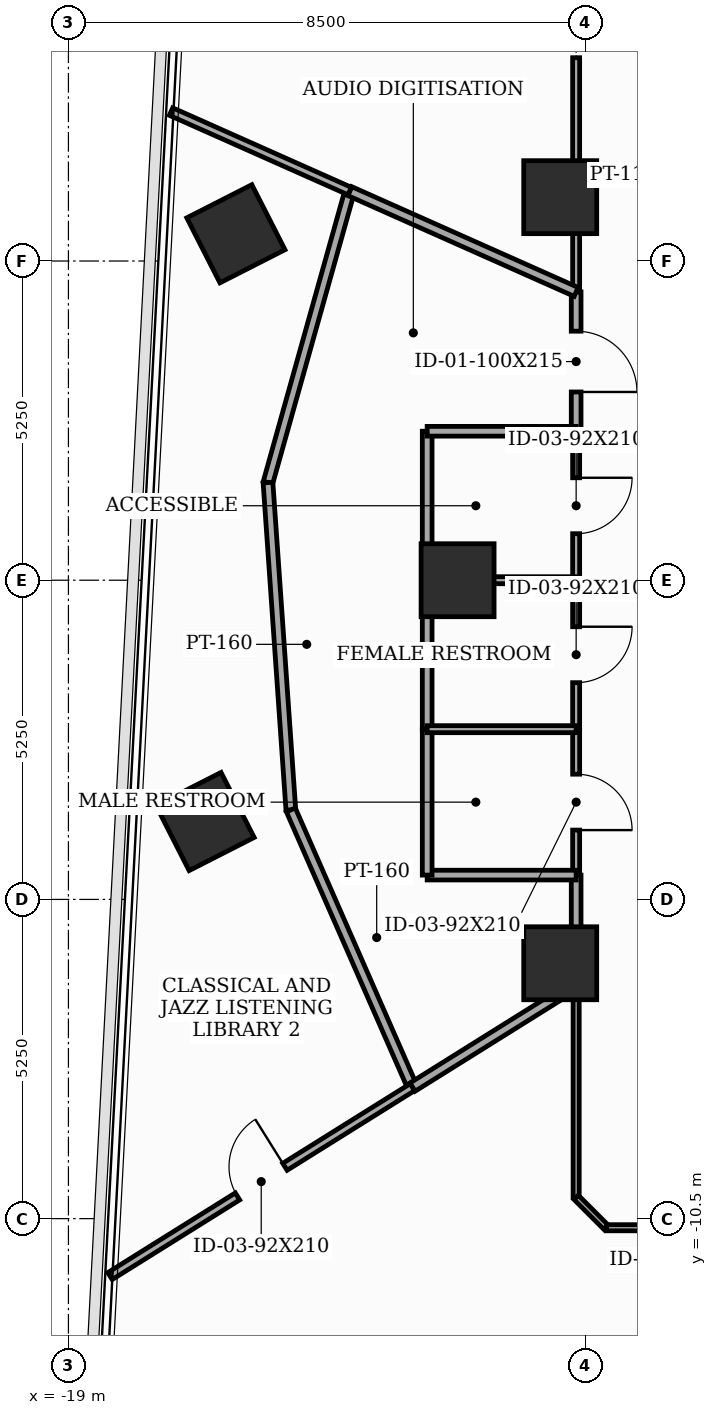
"""IFC4 building model, lengths in metres.
Left out: names, types, materials, properties, quantities, classifications, styles, units other than length and angle.
Written with IfcOpenShell. Run it as: python <this file> out.ifc"""

import sys

from ifc_helpers import new_model, si_unit, direction, frame, frame_2d, origin, origin_2d, place, context, subcontext, project, spatial, rectangle, extrude, element, fill, save


model = new_model("IFC4")
c1 = context("Model", 3, precision=1e-05, world=origin(), true_north=direction((0.0, 1.0)))
c2 = subcontext(c1, "Body", "Model", "MODEL_VIEW")
j1 = project(units=[si_unit("LENGTHUNIT", "METRE"), si_unit("PLANEANGLEUNIT", "RADIAN")], contexts=[c1])
p1 = place(None, origin())
s1 = spatial("IfcSite", under=j1, at=p1, CompositionType="ELEMENT")
p2 = place(p1, origin())
s2 = spatial("IfcBuilding", under=s1, at=p2, CompositionType="ELEMENT")
p3 = place(p2, frame((0.0, 0.0, 131.0)))
s3 = spatial("IfcBuildingStorey", under=s2, at=p3, CompositionType="ELEMENT", Elevation=131.0)
for number, where, z_axis, x_axis in (
    (1, (-10.912, 6.3, 0.0), (0.0, 0.0, 1.0), (1.0, 0.0, 0.0)),
    (2, (-12.6, 0.0, 0.0), (0.0, 0.0, 1.0), (1.0, 0.0, 0.0)),
    (3, (-10.912, -6.3, 0.0), (0.0, 0.0, 1.0), (1.0, 0.0, 0.0)),
    (4, (-16.246, 5.698, 0.0), (0.0, 0.0, 1.0), (0.891, 0.454, 0.0)),
    (5, (-16.752, -3.969, 0.0), (0.0, 0.0, 1.0), (0.891, 0.454, 0.0)),
):
    element("IfcColumn", number, at=place(p3, frame(where, z_axis=z_axis, x_axis=x_axis)), inside=s3, PredefinedType="COLUMN", context=c2, shape_type="SweptSolid", body=[
        extrude(rectangle(XDim=1.2, YDim=1.2, at=origin_2d()), origin(), (0.0, 0.0, 1.0), 3.7),
    ])
p4 = place(p3, frame((-10.65, -4.85, 0.0), z_axis=(0.0, 0.0, 1.0), x_axis=(0.0, -1.0, 0.0)))
e6 = element("IfcWall", 6, at=p4, inside=s3, PredefinedType="PARTITIONING", context=c2, shape_type="SweptSolid", body=[
    extrude(rectangle(XDim=1.805, YDim=0.16, at=frame_2d((0.902, 0.0))), origin(), (0.0, 0.0, 1.0), 2.785),
])
p5 = place(p3, frame((-10.65, 4.742, 0.0), z_axis=(0.0, 0.0, 1.0), x_axis=(0.0, -1.0, 0.0)))
e7 = element("IfcWall", 7, at=p5, inside=s3, PredefinedType="PARTITIONING", context=c2, shape_type="SweptSolid", body=[
    extrude(rectangle(XDim=2.292, YDim=0.16, at=frame_2d((1.146, 0.0))), origin(), (0.0, 0.0, 1.0), 3.5),
])
p6 = place(p5, frame((0.646, 0.0, 0.0)))
e8 = element("IfcOpeningElement", 8, at=p6, cuts=e7, PredefinedType="OPENING", context=c2, shape_type="SweptSolid", body=[
    extrude(rectangle(XDim=1.0, YDim=2.15, at=frame_2d((0.5, 1.075))), frame((0.0, 0.09, 0.0), z_axis=(0.0, -1.0, 0.0), x_axis=(1.0, 0.0, 0.0)), (0.0, 0.0, 1.0), 0.18),
])
p7 = place(p3, frame((-10.65, 0.0, 0.0), z_axis=(0.0, 0.0, 1.0), x_axis=(0.0, -1.0, 0.0)))
e9 = element("IfcWall", 9, at=p7, inside=s3, PredefinedType="PARTITIONING", context=c2, shape_type="SweptSolid", body=[
    extrude(rectangle(XDim=2.45, YDim=0.115, at=frame_2d((1.225, 0.0))), origin(), (0.0, 0.0, 1.0), 2.785),
])
p8 = place(p7, frame((0.765, 0.0, 0.0)))
e10 = element("IfcOpeningElement", 10, at=p8, cuts=e9, PredefinedType="OPENING", context=c2, shape_type="SweptSolid", body=[
    extrude(rectangle(XDim=0.92, YDim=2.1, at=frame_2d((0.46, 1.05))), frame((0.0, 0.067, 0.0), z_axis=(0.0, -1.0, 0.0), x_axis=(1.0, 0.0, 0.0)), (0.0, 0.0, 1.0), 0.135),
])
p9 = place(p3, frame((-10.65, -2.45, 0.0), z_axis=(0.0, 0.0, 1.0), x_axis=(0.0, -1.0, 0.0)))
e11 = element("IfcWall", 11, at=p9, inside=s3, PredefinedType="PARTITIONING", context=c2, shape_type="SweptSolid", body=[
    extrude(rectangle(XDim=2.4, YDim=0.115, at=frame_2d((1.2, 0.0))), origin(), (0.0, 0.0, 1.0), 3.5),
])
p10 = place(p9, frame((0.74, 0.0, 0.0)))
e12 = element("IfcOpeningElement", 12, at=p10, cuts=e11, PredefinedType="OPENING", context=c2, shape_type="SweptSolid", body=[
    extrude(rectangle(XDim=0.92, YDim=2.1, at=frame_2d((0.46, 1.05))), frame((0.0, 0.067, 0.0), z_axis=(0.0, -1.0, 0.0), x_axis=(1.0, 0.0, 0.0)), (0.0, 0.0, 1.0), 0.135),
])
p11 = place(p3, frame((-10.65, -6.655, 0.0), z_axis=(0.0, 0.0, 1.0), x_axis=(0.0, -1.0, 0.0)))
e13 = element("IfcWall", 13, at=p11, inside=s3, PredefinedType="MOVABLE", context=c2, shape_type="SweptSolid", body=[
    extrude(rectangle(XDim=3.495, YDim=0.1, at=frame_2d((1.748, 0.0))), origin(), (0.0, 0.0, 1.0), 2.785),
])
p12 = place(p3, frame((-10.65, -10.15, 0.0), z_axis=(0.0, 0.0, 1.0), x_axis=(0.707106781187, -0.707106781187, 0.0)))
e14 = element("IfcWall", 14, at=p12, inside=s3, PredefinedType="MOVABLE", context=c2, shape_type="SweptSolid", body=[
    extrude(rectangle(XDim=0.707, YDim=0.1, at=frame_2d((0.354, 0.0))), origin(), (0.0, 0.0, 1.0), 3.5),
])
p13 = place(p3, frame((-10.15, -10.65, 0.0), z_axis=(0.0, 0.0, 1.0), x_axis=(1.0, 0.0, 0.0)))
e15 = element("IfcWall", 15, at=p13, inside=s3, PredefinedType="MOVABLE", context=c2, shape_type="SweptSolid", body=[
    extrude(rectangle(XDim=5.847, YDim=0.1, at=frame_2d((2.923, 0.0))), origin(), (0.0, 0.0, 1.0), 2.785),
])
p14 = place(p13, frame((0.709, 0.0, 0.0)))
e16 = element("IfcOpeningElement", 16, at=p14, cuts=e15, PredefinedType="OPENING", context=c2, shape_type="SweptSolid", body=[
    extrude(rectangle(XDim=0.92, YDim=2.1, at=frame_2d((0.46, 1.05))), frame((0.0, 0.06, 0.0), z_axis=(0.0, -1.0, 0.0), x_axis=(1.0, 0.0, 0.0)), (0.0, 0.0, 1.0), 0.12),
])
p15 = place(p3, frame((-10.65, 10.15, 0.0), z_axis=(0.0, 0.0, 1.0), x_axis=(0.0, -1.0, 0.0)))
e17 = element("IfcWall", 17, at=p15, inside=s3, PredefinedType="PARTITIONING", context=c2, shape_type="SweptSolid", body=[
    extrude(rectangle(XDim=5.408, YDim=0.115, at=frame_2d((2.704, 0.0))), origin(), (0.0, 0.0, 1.0), 2.785),
])
p16 = place(p15, frame((0.607, 0.0, 0.0)))
e18 = element("IfcOpeningElement", 18, at=p16, cuts=e17, PredefinedType="OPENING", context=c2, shape_type="SweptSolid", body=[
    extrude(rectangle(XDim=0.95, YDim=2.1, at=frame_2d((0.475, 1.05))), frame((0.0, 0.067, 0.0), z_axis=(0.0, -1.0, 0.0), x_axis=(1.0, 0.0, 0.0)), (0.0, 0.0, 1.0), 0.135),
])
p17 = place(p3, frame((-10.65, 2.45, 0.0), z_axis=(0.0, 0.0, 1.0), x_axis=(0.0, -1.0, 0.0)))
e19 = element("IfcWall", 19, at=p17, inside=s3, PredefinedType="PARTITIONING", context=c2, shape_type="SweptSolid", body=[
    extrude(rectangle(XDim=2.45, YDim=0.115, at=frame_2d((1.225, 0.0))), origin(), (0.0, 0.0, 1.0), 2.785),
])
p18 = place(p17, frame((0.765, 0.0, 0.0)))
e20 = element("IfcOpeningElement", 20, at=p18, cuts=e19, PredefinedType="OPENING", context=c2, shape_type="SweptSolid", body=[
    extrude(rectangle(XDim=0.92, YDim=2.1, at=frame_2d((0.46, 1.05))), frame((0.0, 0.067, 0.0), z_axis=(0.0, -1.0, 0.0), x_axis=(1.0, 0.0, 0.0)), (0.0, 0.0, 1.0), 0.135),
])
p19 = place(p3, frame((-13.1, -2.45, 0.0), z_axis=(0.0, 0.0, 1.0), x_axis=(0.0, 1.0, 0.0)))
e21 = element("IfcWall", 21, at=p19, inside=s3, PredefinedType="PARTITIONING", context=c2, shape_type="SweptSolid", body=[
    extrude(rectangle(XDim=2.45, YDim=0.16, at=frame_2d((1.225, 0.0))), origin(), (0.0, 0.0, 1.0), 2.885),
])
p20 = place(p3, frame((-14.374, 6.4, 0.0), z_axis=(0.0, 0.0, 1.0), x_axis=(-0.269944572541, -0.962875863108, 0.0)))
e22 = element("IfcWall", 22, at=p20, inside=s3, PredefinedType="PARTITIONING", context=c2, shape_type="SweptSolid", body=[
    extrude(rectangle(XDim=4.979, YDim=0.16, at=frame_2d((2.489, 0.0))), origin(), (0.0, 0.0, 1.0), 2.885),
])
p21 = place(p3, frame((-15.718, 1.606, 0.0), z_axis=(0.0, 0.0, 1.0), x_axis=(0.069662122655, -0.997570643447, 0.0)))
e23 = element("IfcWall", 23, at=p21, inside=s3, PredefinedType="PARTITIONING", context=c2, shape_type="SweptSolid", body=[
    extrude(rectangle(XDim=5.397, YDim=0.16, at=frame_2d((2.699, 0.0))), origin(), (0.0, 0.0, 1.0), 2.885),
])
p22 = place(p3, frame((-15.342, -3.778, 0.0), z_axis=(0.0, 0.0, 1.0), x_axis=(0.401510696769, -0.915854333604, 0.0)))
e24 = element("IfcWall", 24, at=p22, inside=s3, PredefinedType="PARTITIONING", context=c2, shape_type="SweptSolid", body=[
    extrude(rectangle(XDim=4.979, YDim=0.16, at=frame_2d((2.489, 0.0))), origin(), (0.0, 0.0, 1.0), 3.125),
])
p23 = place(p3, frame((-10.65, -4.85, 0.0), z_axis=(0.0, 0.0, 1.0), x_axis=(-1.0, 0.0, 0.0)))
e25 = element("IfcWall", 25, at=p23, inside=s3, PredefinedType="PARTITIONING", context=c2, shape_type="SweptSolid", body=[
    extrude(rectangle(XDim=2.45, YDim=0.16, at=frame_2d((1.225, 0.0))), origin(), (0.0, 0.0, 1.0), 2.785),
])
p24 = place(p3, frame((-13.1, -4.85, 0.0), z_axis=(0.0, 0.0, 1.0), x_axis=(0.0, 1.0, 0.0)))
e26 = element("IfcWall", 26, at=p24, inside=s3, PredefinedType="PARTITIONING", context=c2, shape_type="SweptSolid", body=[
    extrude(rectangle(XDim=2.4, YDim=0.16, at=frame_2d((1.2, 0.0))), origin(), (0.0, 0.0, 1.0), 3.5),
])
p25 = place(p3, frame((-13.343, -8.338, 0.0), z_axis=(0.0, 0.0, 1.0), x_axis=(0.848045809732, 0.52992292326, 0.0)))
e27 = element("IfcWall", 27, at=p25, inside=s3, PredefinedType="PARTITIONING", context=c2, shape_type="SweptSolid", body=[
    extrude(rectangle(XDim=3.176, YDim=0.16, at=frame_2d((1.588, 0.0))), origin(), (0.0, 0.0, 1.0), 2.785),
])
p26 = place(p3, frame((-10.65, 4.742, 0.0), z_axis=(0.0, 0.0, 1.0), x_axis=(-0.913556992648, 0.406710734042, 0.0)))
e28 = element("IfcWall", 28, at=p26, inside=s3, PredefinedType="PARTITIONING", context=c2, shape_type="SweptSolid", body=[
    extrude(rectangle(XDim=4.076, YDim=0.16, at=frame_2d((2.038, 0.0))), origin(), (0.0, 0.0, 1.0), 2.785),
])
p27 = place(p3, frame((-13.1, 0.0, 0.0), z_axis=(0.0, 0.0, 1.0), x_axis=(0.0, 1.0, 0.0)))
e29 = element("IfcWall", 29, at=p27, inside=s3, PredefinedType="PARTITIONING", context=c2, shape_type="SweptSolid", body=[
    extrude(rectangle(XDim=2.45, YDim=0.16, at=frame_2d((1.225, 0.0))), origin(), (0.0, 0.0, 1.0), 3.5),
])
p28 = place(p3, frame((-13.1, 2.45, 0.0), z_axis=(0.0, 0.0, 1.0), x_axis=(1.0, 0.0, 0.0)))
e30 = element("IfcWall", 30, at=p28, inside=s3, PredefinedType="PARTITIONING", context=c2, shape_type="SweptSolid", body=[
    extrude(rectangle(XDim=2.45, YDim=0.16, at=frame_2d((1.225, 0.0))), origin(), (0.0, 0.0, 1.0), 2.785),
])
for number, where, z_axis, x_axis in (
    (31, (-13.1, -2.45, 0.0), (0.0, 0.0, 1.0), (1.0, 0.0, 0.0)),
    (32, (-10.65, 0.0, 0.0), (0.0, 0.0, 1.0), (-1.0, 0.0, 0.0)),
):
    element("IfcWall", number, at=place(p3, frame(where, z_axis=z_axis, x_axis=x_axis)), inside=s3, PredefinedType="PARTITIONING", context=c2, shape_type="SweptSolid", body=[
        extrude(rectangle(XDim=2.45, YDim=0.115, at=frame_2d((1.225, 0.0))), origin(), (0.0, 0.0, 1.0), 2.785),
    ])
p29 = place(p3, frame((-18.316, -11.445, 0.0), z_axis=(0.0, 0.0, 1.0), x_axis=(0.848103549297, 0.529830510324, 0.0)))
e33 = element("IfcWall", 33, at=p29, inside=s3, PredefinedType="PARTITIONING", context=c2, shape_type="SweptSolid", body=[
    extrude(rectangle(XDim=5.864, YDim=0.135, at=frame_2d((2.932, 0.0))), origin(), (0.0, 0.0, 1.0), 2.985),
])
p30 = place(p29, frame((2.472, 0.0, 0.0)))
e34 = element("IfcOpeningElement", 34, at=p30, cuts=e33, PredefinedType="OPENING", context=c2, shape_type="SweptSolid", body=[
    extrude(rectangle(XDim=0.92, YDim=2.1, at=frame_2d((0.46, 1.05))), frame((0.0, 0.077, 0.0), z_axis=(0.0, -1.0, 0.0), x_axis=(1.0, 0.0, 0.0)), (0.0, 0.0, 1.0), 0.155),
])
p31 = place(p3, frame((-14.374, 6.4, 0.0), z_axis=(0.0, 0.0, 1.0), x_axis=(-0.913611090133, 0.406589198068, 0.0)))
e35 = element("IfcWall", 35, at=p31, inside=s3, PredefinedType="PARTITIONING", context=c2, shape_type="SweptSolid", body=[
    extrude(rectangle(XDim=3.216, YDim=0.135, at=frame_2d((1.608, 0.0))), origin(), (0.0, 0.0, 1.0), 2.985),
])
p32 = place(p3, frame((-10.102, -25.003, 0.0), z_axis=(0.0, 0.0, 1.0), x_axis=(0.374591600556, 0.927189911935, 0.0)))
e36 = element("IfcWall", 36, at=p32, inside=s3, PredefinedType="MOVABLE", context=c2, shape_type="SweptSolid", body=[
    extrude(rectangle(XDim=15.48, YDim=0.1, at=frame_2d((7.74, 0.0))), origin(), (0.0, 0.0, 1.0), 2.785),
])
p33 = place(p6, origin())
e37 = element("IfcDoor", 37, at=p33, inside=s3, OperationType="SINGLE_SWING_RIGHT", PredefinedType="DOOR", context=c2, shape_type="SweptSolid", body=[
    extrude(rectangle(XDim=1.0, YDim=2.15, at=frame_2d((0.5, 1.075))), frame((0.0, 0.025, 0.0), z_axis=(0.0, -1.0, 0.0), x_axis=(1.0, 0.0, 0.0)), (0.0, 0.0, 1.0), 0.05),
])
fill(e8, e37)
p34 = place(p8, origin())
e38 = element("IfcDoor", 38, at=p34, inside=s3, OperationType="SINGLE_SWING_LEFT", PredefinedType="DOOR", context=c2, shape_type="SweptSolid", body=[
    extrude(rectangle(XDim=0.92, YDim=2.1, at=frame_2d((0.46, 1.05))), frame((0.0, 0.025, 0.0), z_axis=(0.0, -1.0, 0.0), x_axis=(1.0, 0.0, 0.0)), (0.0, 0.0, 1.0), 0.05),
])
fill(e10, e38)
p35 = place(p10, origin())
e39 = element("IfcDoor", 39, at=p35, inside=s3, OperationType="SINGLE_SWING_RIGHT", PredefinedType="DOOR", context=c2, shape_type="SweptSolid", body=[
    extrude(rectangle(XDim=0.92, YDim=2.1, at=frame_2d((0.46, 1.05))), frame((0.0, 0.025, 0.0), z_axis=(0.0, -1.0, 0.0), x_axis=(1.0, 0.0, 0.0)), (0.0, 0.0, 1.0), 0.05),
])
fill(e12, e39)
p36 = place(p16, origin())
e40 = element("IfcDoor", 40, at=p36, inside=s3, OperationType="SLIDING_TO_LEFT", PredefinedType="DOOR", context=c2, shape_type="SweptSolid", body=[
    extrude(rectangle(XDim=0.95, YDim=2.1, at=frame_2d((0.475, 1.05))), frame((0.0, 0.025, 0.0), z_axis=(0.0, -1.0, 0.0), x_axis=(1.0, 0.0, 0.0)), (0.0, 0.0, 1.0), 0.05),
])
fill(e18, e40)
p37 = place(p18, origin())
e41 = element("IfcDoor", 41, at=p37, inside=s3, OperationType="SINGLE_SWING_LEFT", PredefinedType="DOOR", context=c2, shape_type="SweptSolid", body=[
    extrude(rectangle(XDim=0.92, YDim=2.1, at=frame_2d((0.46, 1.05))), frame((0.0, 0.025, 0.0), z_axis=(0.0, -1.0, 0.0), x_axis=(1.0, 0.0, 0.0)), (0.0, 0.0, 1.0), 0.05),
])
fill(e20, e41)
p38 = place(p30, origin())
e42 = element("IfcDoor", 42, at=p38, inside=s3, OperationType="SINGLE_SWING_RIGHT", PredefinedType="DOOR", context=c2, shape_type="SweptSolid", body=[
    extrude(rectangle(XDim=0.92, YDim=2.1, at=frame_2d((0.46, 1.05))), frame((0.0, 0.025, 0.0), z_axis=(0.0, -1.0, 0.0), x_axis=(1.0, 0.0, 0.0)), (0.0, 0.0, 1.0), 0.05),
])
fill(e34, e42)
save(model, sys.argv[1])
